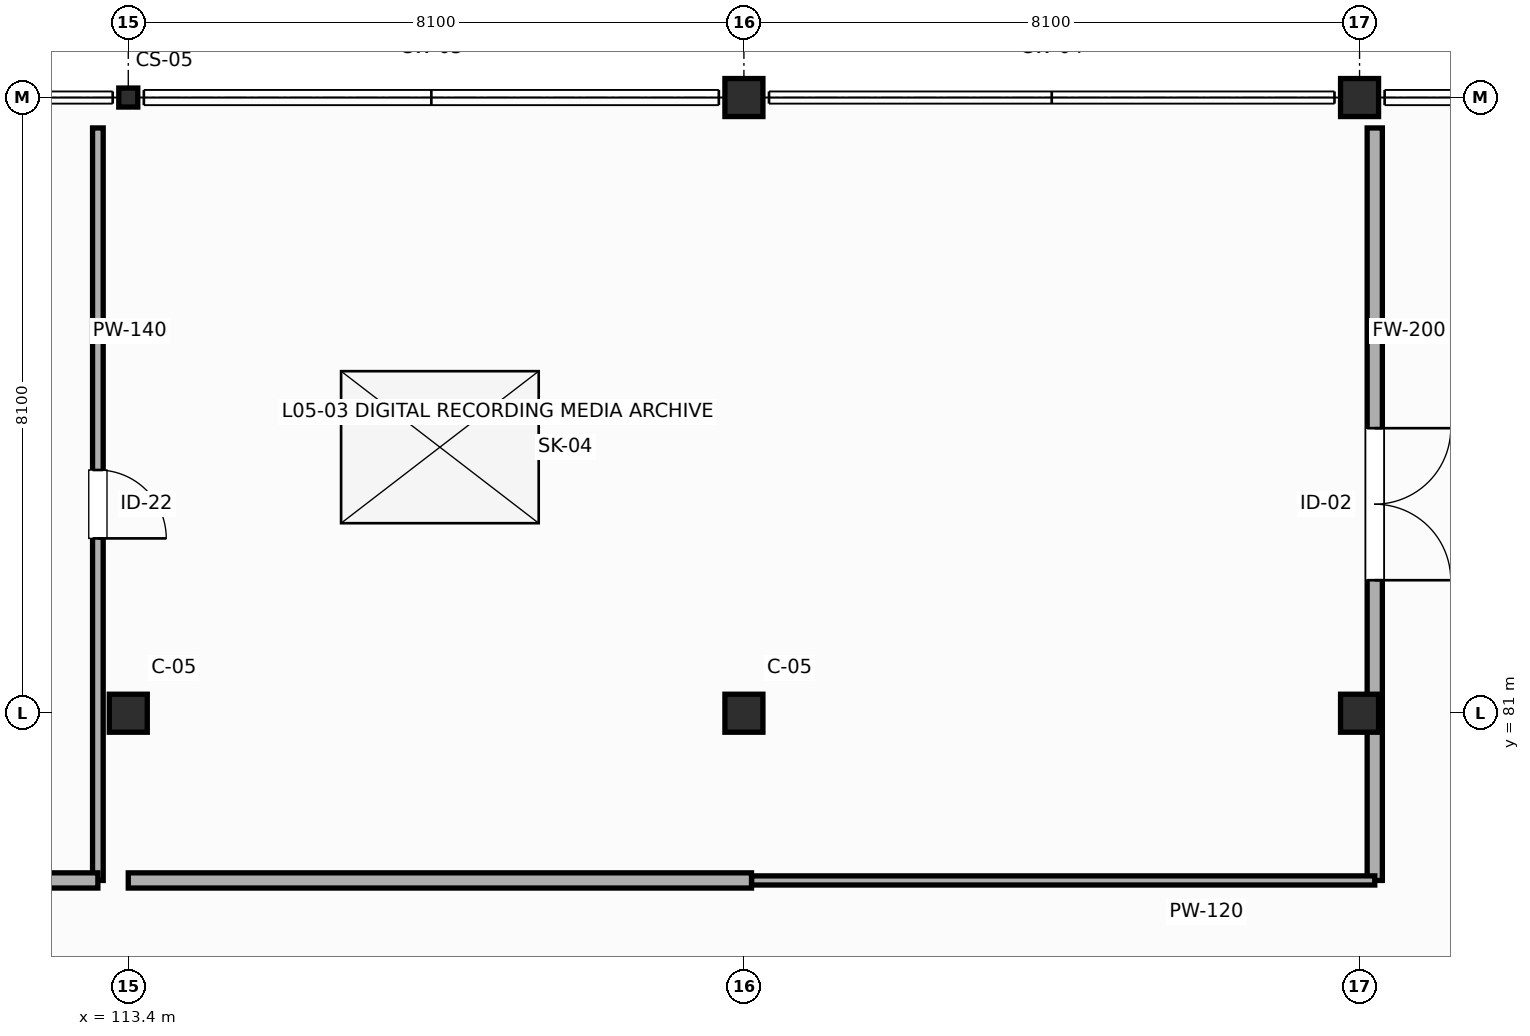
"""IFC4 building model, lengths in metres.
Left out: names, types, materials, properties, quantities, classifications, styles, units other than length and angle.
Written with IfcOpenShell. Run it as: python <this file> out.ifc"""

import sys

from ifc_helpers import new_model, si_unit, direction, frame, frame_2d, origin, origin_2d, place, context, subcontext, project, spatial, rectangle, hollow_rectangle, extrude, element, fill, save


model = new_model("IFC4")
c1 = context("Model", 3, precision=1e-05, world=origin(), true_north=direction((0.0, 1.0)))
c2 = subcontext(c1, "Body", "Model", "MODEL_VIEW")
j1 = project(units=[si_unit("LENGTHUNIT", "METRE"), si_unit("PLANEANGLEUNIT", "RADIAN")], contexts=[c1])
p1 = place(None, origin())
s1 = spatial("IfcSite", under=j1, at=p1, CompositionType="ELEMENT")
p2 = place(p1, origin())
s2 = spatial("IfcBuilding", under=s1, at=p2, CompositionType="ELEMENT")
p3 = place(p2, frame((0.0, 0.0, 23.4)))
s3 = spatial("IfcBuildingStorey", under=s2, at=p3, CompositionType="ELEMENT", Elevation=23.4)
p4 = place(p3, frame((113.4, 81.0, 0.0), z_axis=(0.0, 0.0, 1.0), x_axis=(1.0, 0.0, 0.0)))
e1 = element("IfcColumn", 1, at=p4, inside=s3, PredefinedType="COLUMN", context=c2, shape_type="SweptSolid", body=[
    extrude(rectangle(XDim=0.5, YDim=0.5, at=origin_2d()), origin(), (0.0, 0.0, 1.0), 4.2),
])
p5 = place(p3, frame((113.4, 89.1, 0.0), z_axis=(0.0, 0.0, 1.0), x_axis=(1.0, 0.0, 0.0)))
e2 = element("IfcColumn", 2, at=p5, inside=s3, PredefinedType="COLUMN", context=c2, shape_type="SweptSolid", body=[
    extrude(hollow_rectangle(XDim=0.25, YDim=0.25, WallThickness=0.012, InnerFilletRadius=0.012, OuterFilletRadius=0.025, at=origin_2d()), origin(), (0.0, 0.0, 1.0), 4.2),
])
for number, where, z_axis, x_axis in (
    (3, (121.5, 81.0, 0.0), (0.0, 0.0, 1.0), (1.0, 0.0, 0.0)),
    (4, (121.5, 89.1, 0.0), (0.0, 0.0, 1.0), (1.0, 0.0, 0.0)),
    (5, (129.6, 81.0, 0.0), (0.0, 0.0, 1.0), (1.0, 0.0, 0.0)),
    (6, (129.6, 89.1, 0.0), (0.0, 0.0, 1.0), (1.0, 0.0, 0.0)),
):
    element("IfcColumn", number, at=place(p3, frame(where, z_axis=z_axis, x_axis=x_axis)), inside=s3, PredefinedType="COLUMN", context=c2, shape_type="SweptSolid", body=[
        extrude(rectangle(XDim=0.5, YDim=0.5, at=origin_2d()), origin(), (0.0, 0.0, 1.0), 4.2),
    ])
p6 = place(p3, frame((113.0, 88.7, 0.0), z_axis=(0.0, 0.0, 1.0), x_axis=(0.0, -1.0, 0.0)))
e7 = element("IfcWall", 7, at=p6, inside=s3, PredefinedType="PARTITIONING", context=c2, shape_type="SweptSolid", body=[
    extrude(rectangle(XDim=9.9, YDim=0.14, at=frame_2d((4.95, 0.0))), origin(), (0.0, 0.0, 1.0), 3.264),
])
p7 = place(p6, frame((4.5, 0.0, 0.0)))
e8 = element("IfcOpeningElement", 8, at=p7, cuts=e7, PredefinedType="OPENING", context=c2, shape_type="SweptSolid", body=[
    extrude(rectangle(XDim=0.9, YDim=2.1, at=frame_2d((0.45, 1.05))), frame((0.0, 0.08, 0.0), z_axis=(0.0, -1.0, 0.0), x_axis=(1.0, 0.0, 0.0)), (0.0, 0.0, 1.0), 0.16),
])
p8 = place(p3, frame((113.0, 78.8, 0.0), z_axis=(0.0, 0.0, 1.0), x_axis=(-1.0, 0.0, 0.0)))
e9 = element("IfcWall", 9, at=p8, inside=s3, PredefinedType="PARTITIONING", context=c2, shape_type="SweptSolid", body=[
    extrude(rectangle(XDim=7.933, YDim=0.2, at=frame_2d((3.967, 0.0))), origin(), (0.0, 0.0, 1.0), 3.92),
])
p9 = place(p3, frame((129.8, 88.7, 0.0), z_axis=(0.0, 0.0, 1.0), x_axis=(0.0, -1.0, 0.0)))
e10 = element("IfcWall", 10, at=p9, inside=s3, PredefinedType="PARTITIONING", context=c2, shape_type="SweptSolid", body=[
    extrude(rectangle(XDim=9.9, YDim=0.2, at=frame_2d((4.95, 0.0))), origin(), (0.0, 0.0, 1.0), 3.364),
])
p10 = place(p9, frame((3.95, 0.0, 0.0)))
e11 = element("IfcOpeningElement", 11, at=p10, cuts=e10, PredefinedType="OPENING", context=c2, shape_type="SweptSolid", body=[
    extrude(rectangle(XDim=2.0, YDim=2.5, at=frame_2d((1.0, 1.25))), frame((0.0, 0.11, 0.0), z_axis=(0.0, -1.0, 0.0), x_axis=(1.0, 0.0, 0.0)), (0.0, 0.0, 1.0), 0.22),
])
p11 = place(p3, frame((129.8, 78.8, 0.0), z_axis=(0.0, 0.0, 1.0), x_axis=(-1.0, 0.0, 0.0)))
e12 = element("IfcWall", 12, at=p11, inside=s3, PredefinedType="PARTITIONING", context=c2, shape_type="SweptSolid", body=[
    extrude(rectangle(XDim=8.2, YDim=0.12, at=frame_2d((4.1, 0.0))), origin(), (0.0, 0.0, 1.0), 3.92),
])
p12 = place(p3, frame((121.6, 78.8, 0.0), z_axis=(0.0, 0.0, 1.0), x_axis=(-1.0, 0.0, 0.0)))
e13 = element("IfcWall", 13, at=p12, inside=s3, PredefinedType="PARTITIONING", context=c2, shape_type="SweptSolid", body=[
    extrude(rectangle(XDim=8.2, YDim=0.2, at=frame_2d((4.1, 0.0))), origin(), (0.0, 0.0, 1.0), 3.92),
])
p13 = place(p2, frame((0.0, 0.0, 27.6)))
p14 = place(p13, frame((0.0, 0.0, -0.23)))
p15 = place(p14, frame((117.5, 84.5, 0.0)))
p16 = place(p15, frame((0.0, 0.0, 0.18)))
e14 = element("IfcWindow", 14, at=p16, inside=s3, PartitioningType="SINGLE_PANEL", PredefinedType="SKYLIGHT", context=c2, shape_type="SweptSolid", body=[
    extrude(rectangle(XDim=2.6, YDim=2.0, at=origin_2d()), origin(), (0.0, 0.0, 1.0), 0.05),
])
p17 = place(p7, origin())
e15 = element("IfcDoor", 15, at=p17, inside=s3, OperationType="SINGLE_SWING_RIGHT", PredefinedType="DOOR", context=c2, shape_type="SweptSolid", body=[
    extrude(rectangle(XDim=0.9, YDim=2.1, at=frame_2d((0.45, 1.05))), frame((0.0, 0.025, 0.0), z_axis=(0.0, -1.0, 0.0), x_axis=(1.0, 0.0, 0.0)), (0.0, 0.0, 1.0), 0.05),
])
fill(e8, e15)
p18 = place(p10, origin())
e16 = element("IfcDoor", 16, at=p18, inside=s3, OperationType="DOUBLE_DOOR_SINGLE_SWING", PredefinedType="DOOR", context=c2, shape_type="SweptSolid", body=[
    extrude(rectangle(XDim=2.0, YDim=2.5, at=frame_2d((1.0, 1.25))), frame((0.0, 0.025, 0.0), z_axis=(0.0, -1.0, 0.0), x_axis=(1.0, 0.0, 0.0)), (0.0, 0.0, 1.0), 0.05),
])
fill(e11, e16)
save(model, sys.argv[1])
